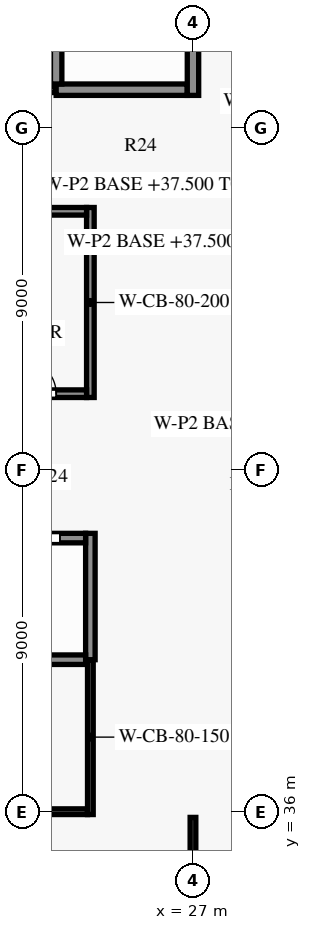
"""IFC4 building model, lengths in metres.
Left out: names, types, materials, properties, quantities, classifications, styles, units other than length and angle.
Written with IfcOpenShell. Run it as: python <this file> out.ifc"""

import sys

from ifc_helpers import new_model, si_unit, direction, frame, frame_2d, origin, place, context, subcontext, project, spatial, rectangle, extrude, element, fill, save


model = new_model("IFC4")
c1 = context("Model", 3, precision=1e-05, world=origin(), true_north=direction((0.0, 1.0)))
c2 = subcontext(c1, "Body", "Model", "MODEL_VIEW")
j1 = project(units=[si_unit("LENGTHUNIT", "METRE"), si_unit("PLANEANGLEUNIT", "RADIAN")], contexts=[c1])
p1 = place(None, origin())
s1 = spatial("IfcSite", under=j1, at=p1, CompositionType="ELEMENT")
p2 = place(p1, origin())
s2 = spatial("IfcBuilding", under=s1, at=p2, CompositionType="ELEMENT")
p3 = place(p2, frame((0.0, 0.0, 37.5)))
s3 = spatial("IfcBuildingStorey", under=s2, at=p3, CompositionType="ELEMENT", Elevation=37.5)
p4 = place(p3, frame((12.4, 36.0, 0.0), z_axis=(0.0, 0.0, 1.0), x_axis=(1.0, 0.0, 0.0)))
e1 = element("IfcWall", 1, at=p4, inside=s3, PredefinedType="SHEAR", context=c2, shape_type="SweptSolid", body=[
    extrude(rectangle(XDim=11.825, YDim=0.15, at=frame_2d((5.913, 0.0))), origin(), (0.0, 0.0, 1.0), 3.3),
])
p5 = place(p4, frame((1.25, 0.0, 0.0)))
e2 = element("IfcOpeningElement", 2, at=p5, cuts=e1, PredefinedType="OPENING", context=c2, shape_type="SweptSolid", body=[
    extrude(rectangle(XDim=0.9, YDim=2.1, at=frame_2d((0.45, 1.05))), frame((0.0, 0.085, 0.0), z_axis=(0.0, -1.0, 0.0), x_axis=(1.0, 0.0, 0.0)), (0.0, 0.0, 1.0), 0.17),
])
p6 = place(p4, frame((5.2, 0.0, 0.0)))
e3 = element("IfcOpeningElement", 3, at=p6, cuts=e1, PredefinedType="OPENING", context=c2, shape_type="SweptSolid", body=[
    extrude(rectangle(XDim=0.9, YDim=2.1, at=frame_2d((0.45, 1.05))), frame((0.0, 0.085, 0.0), z_axis=(0.0, -1.0, 0.0), x_axis=(1.0, 0.0, 0.0)), (0.0, 0.0, 1.0), 0.17),
])
p7 = place(p4, frame((9.425, 0.0, 0.0)))
e4 = element("IfcOpeningElement", 4, at=p7, cuts=e1, PredefinedType="OPENING", context=c2, shape_type="SweptSolid", body=[
    extrude(rectangle(XDim=0.95, YDim=2.1, at=frame_2d((0.475, 1.05))), frame((0.0, 0.085, 0.0), z_axis=(0.0, -1.0, 0.0), x_axis=(1.0, 0.0, 0.0)), (0.0, 0.0, 1.0), 0.17),
])
p8 = place(p3, frame((8.1, 40.0, 0.0), z_axis=(0.0, 0.0, 1.0), x_axis=(1.0, 0.0, 0.0)))
e5 = element("IfcWall", 5, at=p8, inside=s3, PredefinedType="SHEAR", context=c2, shape_type="SweptSolid", body=[
    extrude(rectangle(XDim=16.075, YDim=0.25, at=frame_2d((8.038, 0.0))), origin(), (0.0, 0.0, 1.0), 3.3),
])
p9 = place(p3, frame((8.1, 43.2, 0.0), z_axis=(0.0, 0.0, 1.0), x_axis=(1.0, 0.0, 0.0)))
e6 = element("IfcWall", 6, at=p9, inside=s3, PredefinedType="SHEAR", context=c2, shape_type="SweptSolid", body=[
    extrude(rectangle(XDim=16.075, YDim=0.25, at=frame_2d((8.038, 0.0))), origin(), (0.0, 0.0, 1.0), 3.3),
])
p10 = place(p9, frame((14.3, 0.0, 0.0)))
e7 = element("IfcOpeningElement", 7, at=p10, cuts=e6, PredefinedType="OPENING", context=c2, shape_type="SweptSolid", body=[
    extrude(rectangle(XDim=1.1, YDim=2.1, at=frame_2d((0.55, 1.05))), frame((0.0, 0.135, 0.0), z_axis=(0.0, -1.0, 0.0), x_axis=(1.0, 0.0, 0.0)), (0.0, 0.0, 1.0), 0.27),
])
p11 = place(p9, frame((0.8, 0.0, 0.0)))
e8 = element("IfcOpeningElement", 8, at=p11, cuts=e6, PredefinedType="OPENING", context=c2, shape_type="SweptSolid", body=[
    extrude(rectangle(XDim=1.1, YDim=2.1, at=frame_2d((0.55, 1.05))), frame((0.0, 0.135, 0.0), z_axis=(0.0, -1.0, 0.0), x_axis=(1.0, 0.0, 0.0)), (0.0, 0.0, 1.0), 0.27),
])
p12 = place(p9, frame((3.5, 0.0, 0.0)))
e9 = element("IfcOpeningElement", 9, at=p12, cuts=e6, PredefinedType="OPENING", context=c2, shape_type="SweptSolid", body=[
    extrude(rectangle(XDim=1.1, YDim=2.1, at=frame_2d((0.55, 1.05))), frame((0.0, 0.135, 0.0), z_axis=(0.0, -1.0, 0.0), x_axis=(1.0, 0.0, 0.0)), (0.0, 0.0, 1.0), 0.27),
])
p13 = place(p9, frame((6.2, 0.0, 0.0)))
e10 = element("IfcOpeningElement", 10, at=p13, cuts=e6, PredefinedType="OPENING", context=c2, shape_type="SweptSolid", body=[
    extrude(rectangle(XDim=1.1, YDim=2.1, at=frame_2d((0.55, 1.05))), frame((0.0, 0.135, 0.0), z_axis=(0.0, -1.0, 0.0), x_axis=(1.0, 0.0, 0.0)), (0.0, 0.0, 1.0), 0.27),
])
p14 = place(p9, frame((8.9, 0.0, 0.0)))
e11 = element("IfcOpeningElement", 11, at=p14, cuts=e6, PredefinedType="OPENING", context=c2, shape_type="SweptSolid", body=[
    extrude(rectangle(XDim=1.1, YDim=2.1, at=frame_2d((0.55, 1.05))), frame((0.0, 0.135, 0.0), z_axis=(0.0, -1.0, 0.0), x_axis=(1.0, 0.0, 0.0)), (0.0, 0.0, 1.0), 0.27),
])
p15 = place(p9, frame((11.6, 0.0, 0.0)))
e12 = element("IfcOpeningElement", 12, at=p15, cuts=e6, PredefinedType="OPENING", context=c2, shape_type="SweptSolid", body=[
    extrude(rectangle(XDim=1.1, YDim=2.1, at=frame_2d((0.55, 1.05))), frame((0.0, 0.135, 0.0), z_axis=(0.0, -1.0, 0.0), x_axis=(1.0, 0.0, 0.0)), (0.0, 0.0, 1.0), 0.27),
])
p16 = place(p3, frame((21.6, 47.0, 0.0), z_axis=(0.0, 0.0, 1.0), x_axis=(1.0, 0.0, 0.0)))
e13 = element("IfcWall", 13, at=p16, inside=s3, PredefinedType="PARTITIONING", context=c2, shape_type="SweptSolid", body=[
    extrude(rectangle(XDim=2.6, YDim=0.2, at=frame_2d((1.3, 0.0))), origin(), (0.0, 0.0, 1.0), 3.3),
])
p17 = place(p16, frame((0.9, 0.0, 0.0)))
e14 = element("IfcOpeningElement", 14, at=p17, cuts=e13, PredefinedType="OPENING", context=c2, shape_type="SweptSolid", body=[
    extrude(rectangle(XDim=0.9, YDim=2.1, at=frame_2d((0.45, 1.05))), frame((0.0, 0.11, 0.0), z_axis=(0.0, -1.0, 0.0), x_axis=(1.0, 0.0, 0.0)), (0.0, 0.0, 1.0), 0.22),
])
p18 = place(p3, frame((21.6, 51.8, 0.0), z_axis=(0.0, 0.0, 1.0), x_axis=(1.0, 0.0, 0.0)))
e15 = element("IfcWall", 15, at=p18, inside=s3, PredefinedType="PARTITIONING", context=c2, shape_type="SweptSolid", body=[
    extrude(rectangle(XDim=2.6, YDim=0.2, at=frame_2d((1.3, 0.0))), origin(), (0.0, 0.0, 1.0), 3.3),
])
p19 = place(p3, frame((13.5, 55.0, 0.0), z_axis=(0.0, 0.0, 1.0), x_axis=(1.0, 0.0, 0.0)))
e16 = element("IfcWall", 16, at=p19, inside=s3, PredefinedType="PARTITIONING", context=c2, shape_type="SweptSolid", body=[
    extrude(rectangle(XDim=9.9, YDim=0.15, at=frame_2d((4.95, 0.0))), origin(), (0.0, 0.0, 1.0), 3.3),
])
p20 = place(p19, frame((4.45, 0.0, 0.0)))
e17 = element("IfcOpeningElement", 17, at=p20, cuts=e16, PredefinedType="OPENING", context=c2, shape_type="SweptSolid", body=[
    extrude(rectangle(XDim=1.0, YDim=2.1, at=frame_2d((0.5, 1.05))), frame((0.0, 0.085, 0.0), z_axis=(0.0, -1.0, 0.0), x_axis=(1.0, 0.0, 0.0)), (0.0, 0.0, 1.0), 0.17),
])
p21 = place(p3, frame((23.4, 55.0, 0.0), z_axis=(0.0, 0.0, 1.0), x_axis=(1.0, 0.0, 0.0)))
e18 = element("IfcWall", 18, at=p21, inside=s3, PredefinedType="SHEAR", context=c2, shape_type="SweptSolid", body=[
    extrude(rectangle(XDim=3.45, YDim=0.3, at=frame_2d((1.725, 0.0))), origin(), (0.0, 0.0, 1.0), 3.3),
])
p22 = place(p3, frame((23.4, 55.15, 0.0), z_axis=(0.0, 0.0, 1.0), x_axis=(0.0, 1.0, 0.0)))
e19 = element("IfcWall", 19, at=p22, inside=s3, PredefinedType="SHEAR", context=c2, shape_type="SweptSolid", body=[
    extrude(rectangle(XDim=8.0, YDim=0.3, at=frame_2d((4.0, 0.0))), origin(), (0.0, 0.0, 1.0), 3.3),
])
p23 = place(p3, frame((24.3, 35.925, 0.0), z_axis=(0.0, 0.0, 1.0), x_axis=(0.0, 1.0, 0.0)))
e20 = element("IfcWall", 20, at=p23, inside=s3, PredefinedType="SHEAR", context=c2, shape_type="SweptSolid", body=[
    extrude(rectangle(XDim=4.075, YDim=0.15, at=frame_2d((2.038, 0.0))), origin(), (0.0, 0.0, 1.0), 3.3),
])
p24 = place(p3, frame((24.3, 46.9, 0.0), z_axis=(0.0, 0.0, 1.0), x_axis=(0.0, 1.0, 0.0)))
e21 = element("IfcWall", 21, at=p24, inside=s3, PredefinedType="SHEAR", context=c2, shape_type="SweptSolid", body=[
    extrude(rectangle(XDim=5.0, YDim=0.2, at=frame_2d((2.5, 0.0))), origin(), (0.0, 0.0, 1.0), 3.3),
])
p25 = place(p3, frame((24.3, 40.0, 0.0), z_axis=(0.0, 0.0, 1.0), x_axis=(0.0, 1.0, 0.0)))
e22 = element("IfcWall", 22, at=p25, inside=s3, PredefinedType="SHEAR", context=c2, shape_type="SweptSolid", body=[
    extrude(rectangle(XDim=3.325, YDim=0.25, at=frame_2d((1.663, 0.0))), origin(), (0.0, 0.0, 1.0), 3.3),
])
p26 = place(p3, frame((27.0, 54.85, 0.0), z_axis=(0.0, 0.0, 1.0), x_axis=(0.0, 1.0, 0.0)))
e23 = element("IfcWall", 23, at=p26, inside=s3, PredefinedType="SHEAR", context=c2, shape_type="SweptSolid", body=[
    extrude(rectangle(XDim=8.35, YDim=0.3, at=frame_2d((4.175, 0.0))), origin(), (0.0, 0.0, 1.0), 3.3),
])
p27 = place(p26, frame((6.55, 0.0, 0.0)))
e24 = element("IfcOpeningElement", 24, at=p27, cuts=e23, PredefinedType="OPENING", context=c2, shape_type="SweptSolid", body=[
    extrude(rectangle(XDim=1.2, YDim=2.2, at=frame_2d((0.6, 1.1))), frame((0.0, 0.16, 0.0), z_axis=(0.0, -1.0, 0.0), x_axis=(1.0, 0.0, 0.0)), (0.0, 0.0, 1.0), 0.32),
])
p28 = place(p3, frame((27.0, 27.15, 0.0), z_axis=(0.0, 0.0, 1.0), x_axis=(0.0, 1.0, 0.0)))
e25 = element("IfcWall", 25, at=p28, inside=s3, PredefinedType="PARTITIONING", context=c2, shape_type="SweptSolid", body=[
    extrude(rectangle(XDim=8.7, YDim=0.15, at=frame_2d((4.35, 0.0))), origin(), (0.0, 0.0, 1.0), 3.28),
])
p29 = place(p28, frame((3.45, 0.0, 0.0)))
e26 = element("IfcOpeningElement", 26, at=p29, cuts=e25, PredefinedType="OPENING", context=c2, shape_type="SweptSolid", body=[
    extrude(rectangle(XDim=1.8, YDim=2.1, at=frame_2d((0.9, 1.05))), frame((0.0, 0.085, 0.0), z_axis=(0.0, -1.0, 0.0), x_axis=(1.0, 0.0, 0.0)), (0.0, 0.0, 1.0), 0.17),
])
p30 = place(p17, origin())
e27 = element("IfcDoor", 27, at=p30, inside=s3, OperationType="SINGLE_SWING_LEFT", PredefinedType="DOOR", context=c2, shape_type="SweptSolid", body=[
    extrude(rectangle(XDim=0.9, YDim=2.1, at=frame_2d((0.45, 1.05))), frame((0.0, 0.025, 0.0), z_axis=(0.0, -1.0, 0.0), x_axis=(1.0, 0.0, 0.0)), (0.0, 0.0, 1.0), 0.05),
])
fill(e14, e27)
p31 = place(p10, origin())
e28 = element("IfcDoor", 28, at=p31, inside=s3, OperationType="DOUBLE_DOOR_SLIDING", PredefinedType="DOOR", context=c2, shape_type="SweptSolid", body=[
    extrude(rectangle(XDim=1.1, YDim=2.1, at=frame_2d((0.55, 1.05))), frame((0.0, 0.025, 0.0), z_axis=(0.0, -1.0, 0.0), x_axis=(1.0, 0.0, 0.0)), (0.0, 0.0, 1.0), 0.05),
])
fill(e7, e28)
save(model, sys.argv[1])
